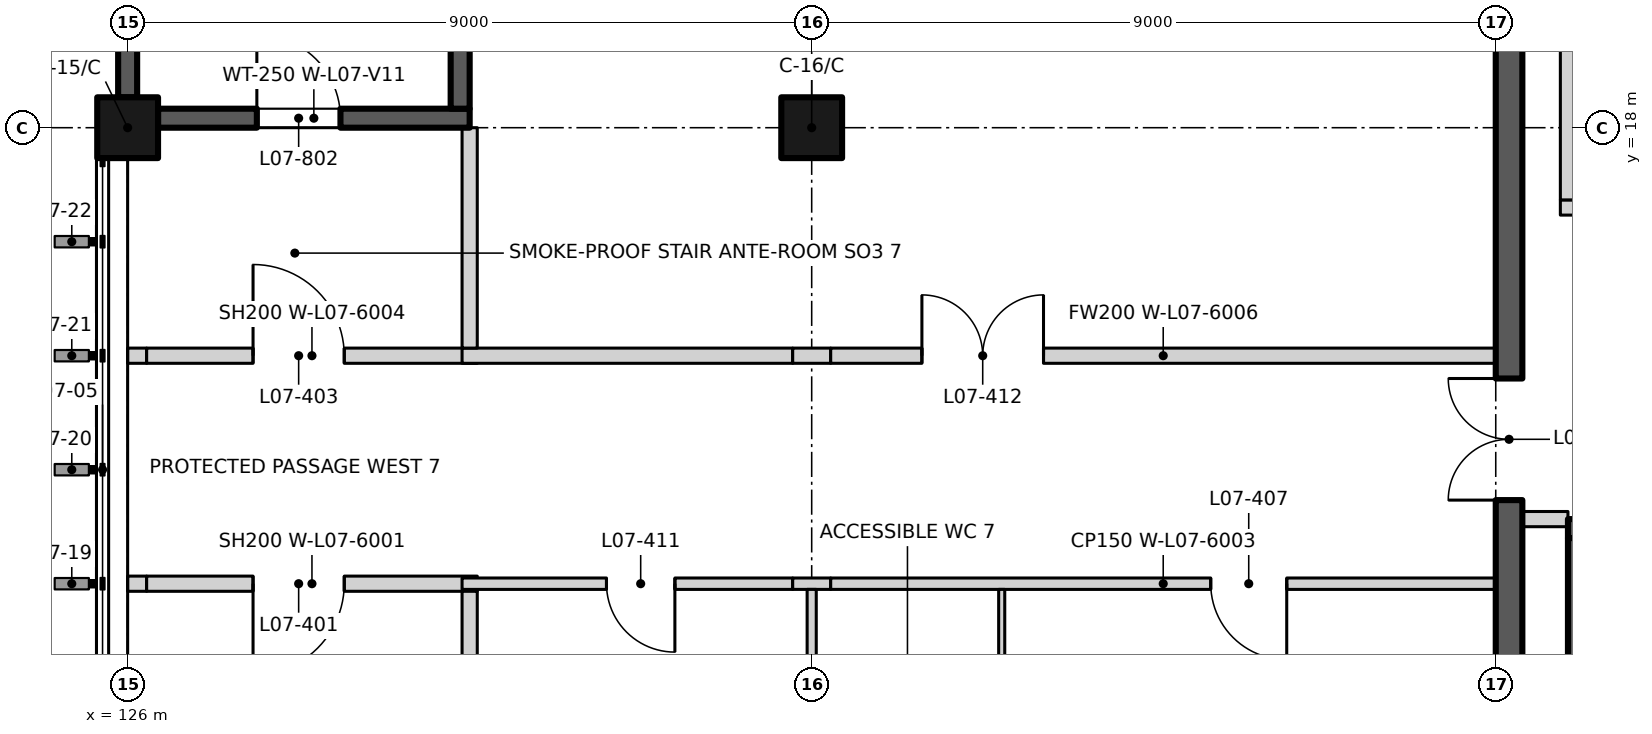
"""IFC4 building model, lengths in metres.
Left out: names, types, materials, properties, quantities, classifications, styles, units other than length and angle.
Written with IfcOpenShell. Run it as: python <this file> out.ifc"""

import sys

from ifc_helpers import new_model, si_unit, direction, frame, frame_2d, origin, origin_2d, place, context, subcontext, project, spatial, rectangle, extrude, element, fill, save


model = new_model("IFC4")
c1 = context("Model", 3, precision=1e-05, world=origin(), true_north=direction((0.0, 1.0)))
c2 = subcontext(c1, "Body", "Model", "MODEL_VIEW")
j1 = project(units=[si_unit("LENGTHUNIT", "METRE"), si_unit("PLANEANGLEUNIT", "RADIAN")], contexts=[c1])
p1 = place(None, origin())
s1 = spatial("IfcSite", under=j1, at=p1, CompositionType="ELEMENT")
p2 = place(p1, origin())
s2 = spatial("IfcBuilding", under=s1, at=p2, CompositionType="ELEMENT")
p3 = place(p2, frame((0.0, 0.0, 33.0)))
s3 = spatial("IfcBuildingStorey", under=s2, at=p3, CompositionType="ELEMENT", Elevation=33.0)
for number, where, z_axis, x_axis in (
    (1, (126.0, 18.0, 0.0), (0.0, 0.0, 1.0), (1.0, 0.0, 0.0)),
    (2, (135.0, 18.0, 0.0), (0.0, 0.0, 1.0), (1.0, 0.0, 0.0)),
):
    element("IfcColumn", number, at=place(p3, frame(where, z_axis=z_axis, x_axis=x_axis)), inside=s3, PredefinedType="COLUMN", context=c2, shape_type="SweptSolid", body=[
        extrude(rectangle(XDim=0.8, YDim=0.8, at=origin_2d()), origin(), (0.0, 0.0, 1.0), 4.5),
    ])
p4 = place(p3, frame((126.4, 18.125, 0.0), z_axis=(0.0, 0.0, 1.0), x_axis=(1.0, 0.0, 0.0)))
e3 = element("IfcWall", 3, at=p4, inside=s3, PredefinedType="SHEAR", context=c2, shape_type="SweptSolid", body=[
    extrude(rectangle(XDim=4.1, YDim=0.25, at=frame_2d((2.05, 0.0))), origin(), (0.0, 0.0, 1.0), 4.5),
])
p5 = place(p4, frame((1.3, 0.0, 0.0)))
e4 = element("IfcOpeningElement", 4, at=p5, cuts=e3, PredefinedType="OPENING", context=c2, shape_type="SweptSolid", body=[
    extrude(rectangle(XDim=1.1, YDim=2.1, at=frame_2d((0.55, 1.05))), frame((0.0, 0.135, 0.0), z_axis=(0.0, -1.0, 0.0), x_axis=(1.0, 0.0, 0.0)), (0.0, 0.0, 1.0), 0.27),
])
p6 = place(p3, frame((126.0, 18.4, 0.0), z_axis=(0.0, 0.0, 1.0), x_axis=(0.0, 1.0, 0.0)))
e5 = element("IfcWall", 5, at=p6, inside=s3, PredefinedType="SHEAR", context=c2, shape_type="SweptSolid", body=[
    extrude(rectangle(XDim=8.2, YDim=0.25, at=frame_2d((4.1, 0.0))), origin(), (0.0, 0.0, 1.0), 4.5),
])
p7 = place(p3, frame((130.375, 18.25, 0.0), z_axis=(0.0, 0.0, 1.0), x_axis=(0.0, 1.0, 0.0)))
e6 = element("IfcWall", 6, at=p7, inside=s3, PredefinedType="SHEAR", context=c2, shape_type="SweptSolid", body=[
    extrude(rectangle(XDim=8.625, YDim=0.25, at=frame_2d((4.312, 0.0))), origin(), (0.0, 0.0, 1.0), 4.5),
])
p8 = place(p3, frame((144.95, 12.725, 0.0), z_axis=(0.0, 0.0, 1.0), x_axis=(1.0, 0.0, 0.0)))
e7 = element("IfcWall", 7, at=p8, inside=s3, PredefinedType="SHEAR", context=c2, shape_type="SweptSolid", body=[
    extrude(rectangle(XDim=12.05, YDim=0.25, at=frame_2d((6.025, 0.0))), origin(), (0.0, 0.0, 1.0), 4.5),
])
p9 = place(p8, frame((1.05, 0.0, 0.0)))
e8 = element("IfcOpeningElement", 8, at=p9, cuts=e7, PredefinedType="OPENING", context=c2, shape_type="SweptSolid", body=[
    extrude(rectangle(XDim=1.1, YDim=2.1, at=frame_2d((0.55, 1.05))), frame((0.0, 0.135, 0.0), z_axis=(0.0, -1.0, 0.0), x_axis=(1.0, 0.0, 0.0)), (0.0, 0.0, 1.0), 0.27),
])
p10 = place(p8, frame((4.0, 0.0, 0.0)))
e9 = element("IfcOpeningElement", 9, at=p10, cuts=e7, PredefinedType="OPENING", context=c2, shape_type="SweptSolid", body=[
    extrude(rectangle(XDim=1.1, YDim=2.1, at=frame_2d((0.55, 1.05))), frame((0.0, 0.135, 0.0), z_axis=(0.0, -1.0, 0.0), x_axis=(1.0, 0.0, 0.0)), (0.0, 0.0, 1.0), 0.27),
])
p11 = place(p8, frame((6.95, 0.0, 0.0)))
e10 = element("IfcOpeningElement", 10, at=p11, cuts=e7, PredefinedType="OPENING", context=c2, shape_type="SweptSolid", body=[
    extrude(rectangle(XDim=1.1, YDim=2.1, at=frame_2d((0.55, 1.05))), frame((0.0, 0.135, 0.0), z_axis=(0.0, -1.0, 0.0), x_axis=(1.0, 0.0, 0.0)), (0.0, 0.0, 1.0), 0.27),
])
p12 = place(p8, frame((9.9, 0.0, 0.0)))
e11 = element("IfcOpeningElement", 11, at=p12, cuts=e7, PredefinedType="OPENING", context=c2, shape_type="SweptSolid", body=[
    extrude(rectangle(XDim=1.1, YDim=2.1, at=frame_2d((0.55, 1.05))), frame((0.0, 0.135, 0.0), z_axis=(0.0, -1.0, 0.0), x_axis=(1.0, 0.0, 0.0)), (0.0, 0.0, 1.0), 0.27),
])
p13 = place(p3, frame((145.075, 9.9, 0.0), z_axis=(0.0, 0.0, 1.0), x_axis=(0.0, 1.0, 0.0)))
e12 = element("IfcWall", 12, at=p13, inside=s3, PredefinedType="SHEAR", context=c2, shape_type="SweptSolid", body=[
    extrude(rectangle(XDim=2.7, YDim=0.25, at=frame_2d((1.35, 0.0))), origin(), (0.0, 0.0, 1.0), 4.5),
])
p14 = place(p3, frame((126.0, 12.0, 0.0), z_axis=(0.0, 0.0, 1.0), x_axis=(1.0, 0.0, 0.0)))
e13 = element("IfcWall", 13, at=p14, inside=s3, PredefinedType="PARTITIONING", context=c2, shape_type="SweptSolid", body=[
    extrude(rectangle(XDim=0.25, YDim=0.2, at=frame_2d((0.125, 0.0))), origin(), (0.0, 0.0, 1.0), 3.6),
])
p15 = place(p3, frame((126.25, 12.0, 0.0), z_axis=(0.0, 0.0, 1.0), x_axis=(1.0, 0.0, 0.0)))
e14 = element("IfcWall", 14, at=p15, inside=s3, PredefinedType="PARTITIONING", context=c2, shape_type="SweptSolid", body=[
    extrude(rectangle(XDim=4.35, YDim=0.2, at=frame_2d((2.175, 0.0))), origin(), (0.0, 0.0, 1.0), 4.2),
])
p16 = place(p15, frame((2.6, 0.0, 0.0), z_axis=(0.0, 0.0, 1.0), x_axis=(-1.0, 0.0, 0.0)))
e15 = element("IfcOpeningElement", 15, at=p16, cuts=e14, PredefinedType="OPENING", context=c2, shape_type="SweptSolid", body=[
    extrude(rectangle(XDim=1.2, YDim=2.1, at=frame_2d((0.6, 1.05))), frame((0.0, 0.11, 0.0), z_axis=(0.0, -1.0, 0.0), x_axis=(1.0, 0.0, 0.0)), (0.0, 0.0, 1.0), 0.22),
])
p17 = place(p3, frame((130.4, 12.0, 0.0), z_axis=(0.0, 0.0, 1.0), x_axis=(1.0, 0.0, 0.0)))
e16 = element("IfcWall", 16, at=p17, inside=s3, PredefinedType="PARTITIONING", context=c2, shape_type="SweptSolid", body=[
    extrude(rectangle(XDim=4.35, YDim=0.15, at=frame_2d((2.175, 0.0))), origin(), (0.0, 0.0, 1.0), 4.2),
])
p18 = place(p17, frame((2.8, 0.0, 0.0), z_axis=(0.0, 0.0, 1.0), x_axis=(-1.0, 0.0, 0.0)))
e17 = element("IfcOpeningElement", 17, at=p18, cuts=e16, PredefinedType="OPENING", context=c2, shape_type="SweptSolid", body=[
    extrude(rectangle(XDim=0.9, YDim=2.1, at=frame_2d((0.45, 1.05))), frame((0.0, 0.085, 0.0), z_axis=(0.0, -1.0, 0.0), x_axis=(1.0, 0.0, 0.0)), (0.0, 0.0, 1.0), 0.17),
])
p19 = place(p3, frame((134.75, 12.0, 0.0), z_axis=(0.0, 0.0, 1.0), x_axis=(1.0, 0.0, 0.0)))
e18 = element("IfcWall", 18, at=p19, inside=s3, PredefinedType="PARTITIONING", context=c2, shape_type="SweptSolid", body=[
    extrude(rectangle(XDim=0.5, YDim=0.15, at=frame_2d((0.25, 0.0))), origin(), (0.0, 0.0, 1.0), 3.6),
])
p20 = place(p3, frame((135.25, 12.0, 0.0), z_axis=(0.0, 0.0, 1.0), x_axis=(1.0, 0.0, 0.0)))
e19 = element("IfcWall", 19, at=p20, inside=s3, PredefinedType="PARTITIONING", context=c2, shape_type="SweptSolid", body=[
    extrude(rectangle(XDim=8.75, YDim=0.15, at=frame_2d((4.375, 0.0))), origin(), (0.0, 0.0, 1.0), 4.2),
])
p21 = place(p20, frame((6.0, 0.0, 0.0), z_axis=(0.0, 0.0, 1.0), x_axis=(-1.0, 0.0, 0.0)))
e20 = element("IfcOpeningElement", 20, at=p21, cuts=e19, PredefinedType="OPENING", context=c2, shape_type="SweptSolid", body=[
    extrude(rectangle(XDim=1.0, YDim=2.1, at=frame_2d((0.5, 1.05))), frame((0.0, 0.085, 0.0), z_axis=(0.0, -1.0, 0.0), x_axis=(1.0, 0.0, 0.0)), (0.0, 0.0, 1.0), 0.17),
])
p22 = place(p3, frame((144.35, 12.85, 0.0), z_axis=(0.0, 0.0, 1.0), x_axis=(1.0, 0.0, 0.0)))
e21 = element("IfcWall", 21, at=p22, inside=s3, PredefinedType="PARTITIONING", context=c2, shape_type="SweptSolid", body=[
    extrude(rectangle(XDim=0.6, YDim=0.2, at=frame_2d((0.3, 0.0))), origin(), (0.0, 0.0, 1.0), 4.2),
])
p23 = place(p3, frame((126.0, 15.0, 0.0), z_axis=(0.0, 0.0, 1.0), x_axis=(1.0, 0.0, 0.0)))
e22 = element("IfcWall", 22, at=p23, inside=s3, PredefinedType="PARTITIONING", context=c2, shape_type="SweptSolid", body=[
    extrude(rectangle(XDim=0.25, YDim=0.2, at=frame_2d((0.125, 0.0))), origin(), (0.0, 0.0, 1.0), 3.6),
])
p24 = place(p3, frame((126.25, 15.0, 0.0), z_axis=(0.0, 0.0, 1.0), x_axis=(1.0, 0.0, 0.0)))
e23 = element("IfcWall", 23, at=p24, inside=s3, PredefinedType="PARTITIONING", context=c2, shape_type="SweptSolid", body=[
    extrude(rectangle(XDim=4.35, YDim=0.2, at=frame_2d((2.175, 0.0))), origin(), (0.0, 0.0, 1.0), 4.2),
])
p25 = place(p24, frame((1.4, 0.0, 0.0)))
e24 = element("IfcOpeningElement", 24, at=p25, cuts=e23, PredefinedType="OPENING", context=c2, shape_type="SweptSolid", body=[
    extrude(rectangle(XDim=1.2, YDim=2.1, at=frame_2d((0.6, 1.05))), frame((0.0, 0.11, 0.0), z_axis=(0.0, -1.0, 0.0), x_axis=(1.0, 0.0, 0.0)), (0.0, 0.0, 1.0), 0.22),
])
p26 = place(p3, frame((130.4, 15.0, 0.0), z_axis=(0.0, 0.0, 1.0), x_axis=(1.0, 0.0, 0.0)))
e25 = element("IfcWall", 25, at=p26, inside=s3, PredefinedType="PARTITIONING", context=c2, shape_type="SweptSolid", body=[
    extrude(rectangle(XDim=4.35, YDim=0.2, at=frame_2d((2.175, 0.0))), origin(), (0.0, 0.0, 1.0), 4.2),
])
p27 = place(p3, frame((134.75, 15.0, 0.0), z_axis=(0.0, 0.0, 1.0), x_axis=(1.0, 0.0, 0.0)))
e26 = element("IfcWall", 26, at=p27, inside=s3, PredefinedType="PARTITIONING", context=c2, shape_type="SweptSolid", body=[
    extrude(rectangle(XDim=0.5, YDim=0.2, at=frame_2d((0.25, 0.0))), origin(), (0.0, 0.0, 1.0), 3.6),
])
p28 = place(p3, frame((135.25, 15.0, 0.0), z_axis=(0.0, 0.0, 1.0), x_axis=(1.0, 0.0, 0.0)))
e27 = element("IfcWall", 27, at=p28, inside=s3, PredefinedType="PARTITIONING", context=c2, shape_type="SweptSolid", body=[
    extrude(rectangle(XDim=8.75, YDim=0.2, at=frame_2d((4.375, 0.0))), origin(), (0.0, 0.0, 1.0), 4.2),
])
p29 = place(p28, frame((1.2, 0.0, 0.0)))
e28 = element("IfcOpeningElement", 28, at=p29, cuts=e27, PredefinedType="OPENING", context=c2, shape_type="SweptSolid", body=[
    extrude(rectangle(XDim=1.6, YDim=2.1, at=frame_2d((0.8, 1.05))), frame((0.0, 0.11, 0.0), z_axis=(0.0, -1.0, 0.0), x_axis=(1.0, 0.0, 0.0)), (0.0, 0.0, 1.0), 0.22),
])
p30 = place(p3, frame((144.85, 16.95, 0.0), z_axis=(0.0, 0.0, 1.0), x_axis=(1.0, 0.0, 0.0)))
e29 = element("IfcWall", 29, at=p30, inside=s3, PredefinedType="PARTITIONING", context=c2, shape_type="SweptSolid", body=[
    extrude(rectangle(XDim=6.35, YDim=0.2, at=frame_2d((3.175, 0.0))), origin(), (0.0, 0.0, 1.0), 4.2),
])
p31 = place(p30, frame((2.575, 0.0, 0.0)))
e30 = element("IfcOpeningElement", 30, at=p31, cuts=e29, PredefinedType="OPENING", context=c2, shape_type="SweptSolid", body=[
    extrude(rectangle(XDim=1.2, YDim=2.1, at=frame_2d((0.6, 1.05))), frame((0.0, 0.11, 0.0), z_axis=(0.0, -1.0, 0.0), x_axis=(1.0, 0.0, 0.0)), (0.0, 0.0, 1.0), 0.22),
])
for number, where, z_axis, x_axis in (
    (31, (130.5, 9.0, 0.0), (0.0, 0.0, 1.0), (0.0, 1.0, 0.0)),
    (32, (130.5, 15.1, 0.0), (0.0, 0.0, 1.0), (0.0, 1.0, 0.0)),
):
    element("IfcWall", number, at=place(p3, frame(where, z_axis=z_axis, x_axis=x_axis)), inside=s3, PredefinedType="PARTITIONING", context=c2, shape_type="SweptSolid", body=[
        extrude(rectangle(XDim=2.9, YDim=0.2, at=frame_2d((1.45, 0.0))), origin(), (0.0, 0.0, 1.0), 4.2),
    ])
p32 = place(p3, frame((135.0, 9.4, 0.0), z_axis=(0.0, 0.0, 1.0), x_axis=(0.0, 1.0, 0.0)))
e33 = element("IfcWall", 33, at=p32, inside=s3, PredefinedType="PARTITIONING", context=c2, shape_type="SweptSolid", body=[
    extrude(rectangle(XDim=2.525, YDim=0.12, at=frame_2d((1.263, 0.0))), origin(), (0.0, 0.0, 1.0), 3.6),
])
p33 = place(p3, frame((137.5, 9.25, 0.0), z_axis=(0.0, 0.0, 1.0), x_axis=(0.0, 1.0, 0.0)))
e34 = element("IfcWall", 34, at=p33, inside=s3, PredefinedType="PARTITIONING", context=c2, shape_type="SweptSolid", body=[
    extrude(rectangle(XDim=2.675, YDim=0.08, at=frame_2d((1.337, 0.0))), origin(), (0.0, 0.0, 1.0), 4.2),
])
p34 = place(p33, origin())
e35 = element("IfcOpeningElement", 35, at=p34, cuts=e34, PredefinedType="OPENING", context=c2, shape_type="SweptSolid", body=[
    extrude(rectangle(XDim=1.0, YDim=2.1, at=frame_2d((0.5, 1.05))), frame((0.0, 0.05, 0.0), z_axis=(0.0, -1.0, 0.0), x_axis=(1.0, 0.0, 0.0)), (0.0, 0.0, 1.0), 0.1),
])
p35 = place(p3, frame((144.175, 9.35, 0.0), z_axis=(0.0, 0.0, 1.0), x_axis=(0.0, 1.0, 0.0)))
e36 = element("IfcWall", 36, at=p35, inside=s3, PredefinedType="SHEAR", context=c2, shape_type="SweptSolid", body=[
    extrude(rectangle(XDim=17.4, YDim=0.35, at=frame_2d((8.7, 0.0))), origin(), (0.0, 0.0, 1.0), 4.2),
])
p36 = place(p35, frame((3.75, 0.0, 0.0)))
e37 = element("IfcOpeningElement", 37, at=p36, cuts=e36, PredefinedType="OPENING", context=c2, shape_type="SweptSolid", body=[
    extrude(rectangle(XDim=1.6, YDim=2.4, at=frame_2d((0.8, 1.2))), frame((0.0, 0.185, 0.0), z_axis=(0.0, -1.0, 0.0), x_axis=(1.0, 0.0, 0.0)), (0.0, 0.0, 1.0), 0.37),
])
p37 = place(p3, frame((144.95, 17.05, 0.0), z_axis=(0.0, 0.0, 1.0), x_axis=(0.0, 1.0, 0.0)))
e38 = element("IfcWall", 38, at=p37, inside=s3, PredefinedType="PARTITIONING", context=c2, shape_type="SweptSolid", body=[
    extrude(rectangle(XDim=2.8, YDim=0.2, at=frame_2d((1.4, 0.0))), origin(), (0.0, 0.0, 1.0), 4.2),
])
p38 = place(p5, origin())
e39 = element("IfcDoor", 39, at=p38, inside=s3, OperationType="SINGLE_SWING_LEFT", PredefinedType="DOOR", context=c2, shape_type="SweptSolid", body=[
    extrude(rectangle(XDim=1.1, YDim=2.1, at=frame_2d((0.55, 1.05))), frame((0.0, 0.025, 0.0), z_axis=(0.0, -1.0, 0.0), x_axis=(1.0, 0.0, 0.0)), (0.0, 0.0, 1.0), 0.05),
])
fill(e4, e39)
p39 = place(p16, origin())
e40 = element("IfcDoor", 40, at=p39, inside=s3, OperationType="SINGLE_SWING_RIGHT", PredefinedType="DOOR", context=c2, shape_type="SweptSolid", body=[
    extrude(rectangle(XDim=1.2, YDim=2.1, at=frame_2d((0.6, 1.05))), frame((0.0, 0.025, 0.0), z_axis=(0.0, -1.0, 0.0), x_axis=(1.0, 0.0, 0.0)), (0.0, 0.0, 1.0), 0.05),
])
fill(e15, e40)
p40 = place(p25, origin())
e41 = element("IfcDoor", 41, at=p40, inside=s3, OperationType="SINGLE_SWING_LEFT", PredefinedType="DOOR", context=c2, shape_type="SweptSolid", body=[
    extrude(rectangle(XDim=1.2, YDim=2.1, at=frame_2d((0.6, 1.05))), frame((0.0, 0.025, 0.0), z_axis=(0.0, -1.0, 0.0), x_axis=(1.0, 0.0, 0.0)), (0.0, 0.0, 1.0), 0.05),
])
fill(e24, e41)
p41 = place(p36, origin())
e42 = element("IfcDoor", 42, at=p41, inside=s3, OperationType="DOUBLE_DOOR_SINGLE_SWING", PredefinedType="DOOR", context=c2, shape_type="SweptSolid", body=[
    extrude(rectangle(XDim=1.6, YDim=2.4, at=frame_2d((0.8, 1.2))), frame((0.0, 0.025, 0.0), z_axis=(0.0, -1.0, 0.0), x_axis=(1.0, 0.0, 0.0)), (0.0, 0.0, 1.0), 0.05),
])
fill(e37, e42)
p42 = place(p21, origin())
e43 = element("IfcDoor", 43, at=p42, inside=s3, OperationType="SINGLE_SWING_LEFT", PredefinedType="DOOR", context=c2, shape_type="SweptSolid", body=[
    extrude(rectangle(XDim=1.0, YDim=2.1, at=frame_2d((0.5, 1.05))), frame((0.0, 0.025, 0.0), z_axis=(0.0, -1.0, 0.0), x_axis=(1.0, 0.0, 0.0)), (0.0, 0.0, 1.0), 0.05),
])
fill(e20, e43)
p43 = place(p18, origin())
e44 = element("IfcDoor", 44, at=p43, inside=s3, OperationType="SINGLE_SWING_LEFT", PredefinedType="DOOR", context=c2, shape_type="SweptSolid", body=[
    extrude(rectangle(XDim=0.9, YDim=2.1, at=frame_2d((0.45, 1.05))), frame((0.0, 0.025, 0.0), z_axis=(0.0, -1.0, 0.0), x_axis=(1.0, 0.0, 0.0)), (0.0, 0.0, 1.0), 0.05),
])
fill(e17, e44)
p44 = place(p29, origin())
e45 = element("IfcDoor", 45, at=p44, inside=s3, OperationType="DOUBLE_DOOR_SINGLE_SWING", PredefinedType="DOOR", context=c2, shape_type="SweptSolid", body=[
    extrude(rectangle(XDim=1.6, YDim=2.1, at=frame_2d((0.8, 1.05))), frame((0.0, 0.025, 0.0), z_axis=(0.0, -1.0, 0.0), x_axis=(1.0, 0.0, 0.0)), (0.0, 0.0, 1.0), 0.05),
])
fill(e28, e45)
save(model, sys.argv[1])
